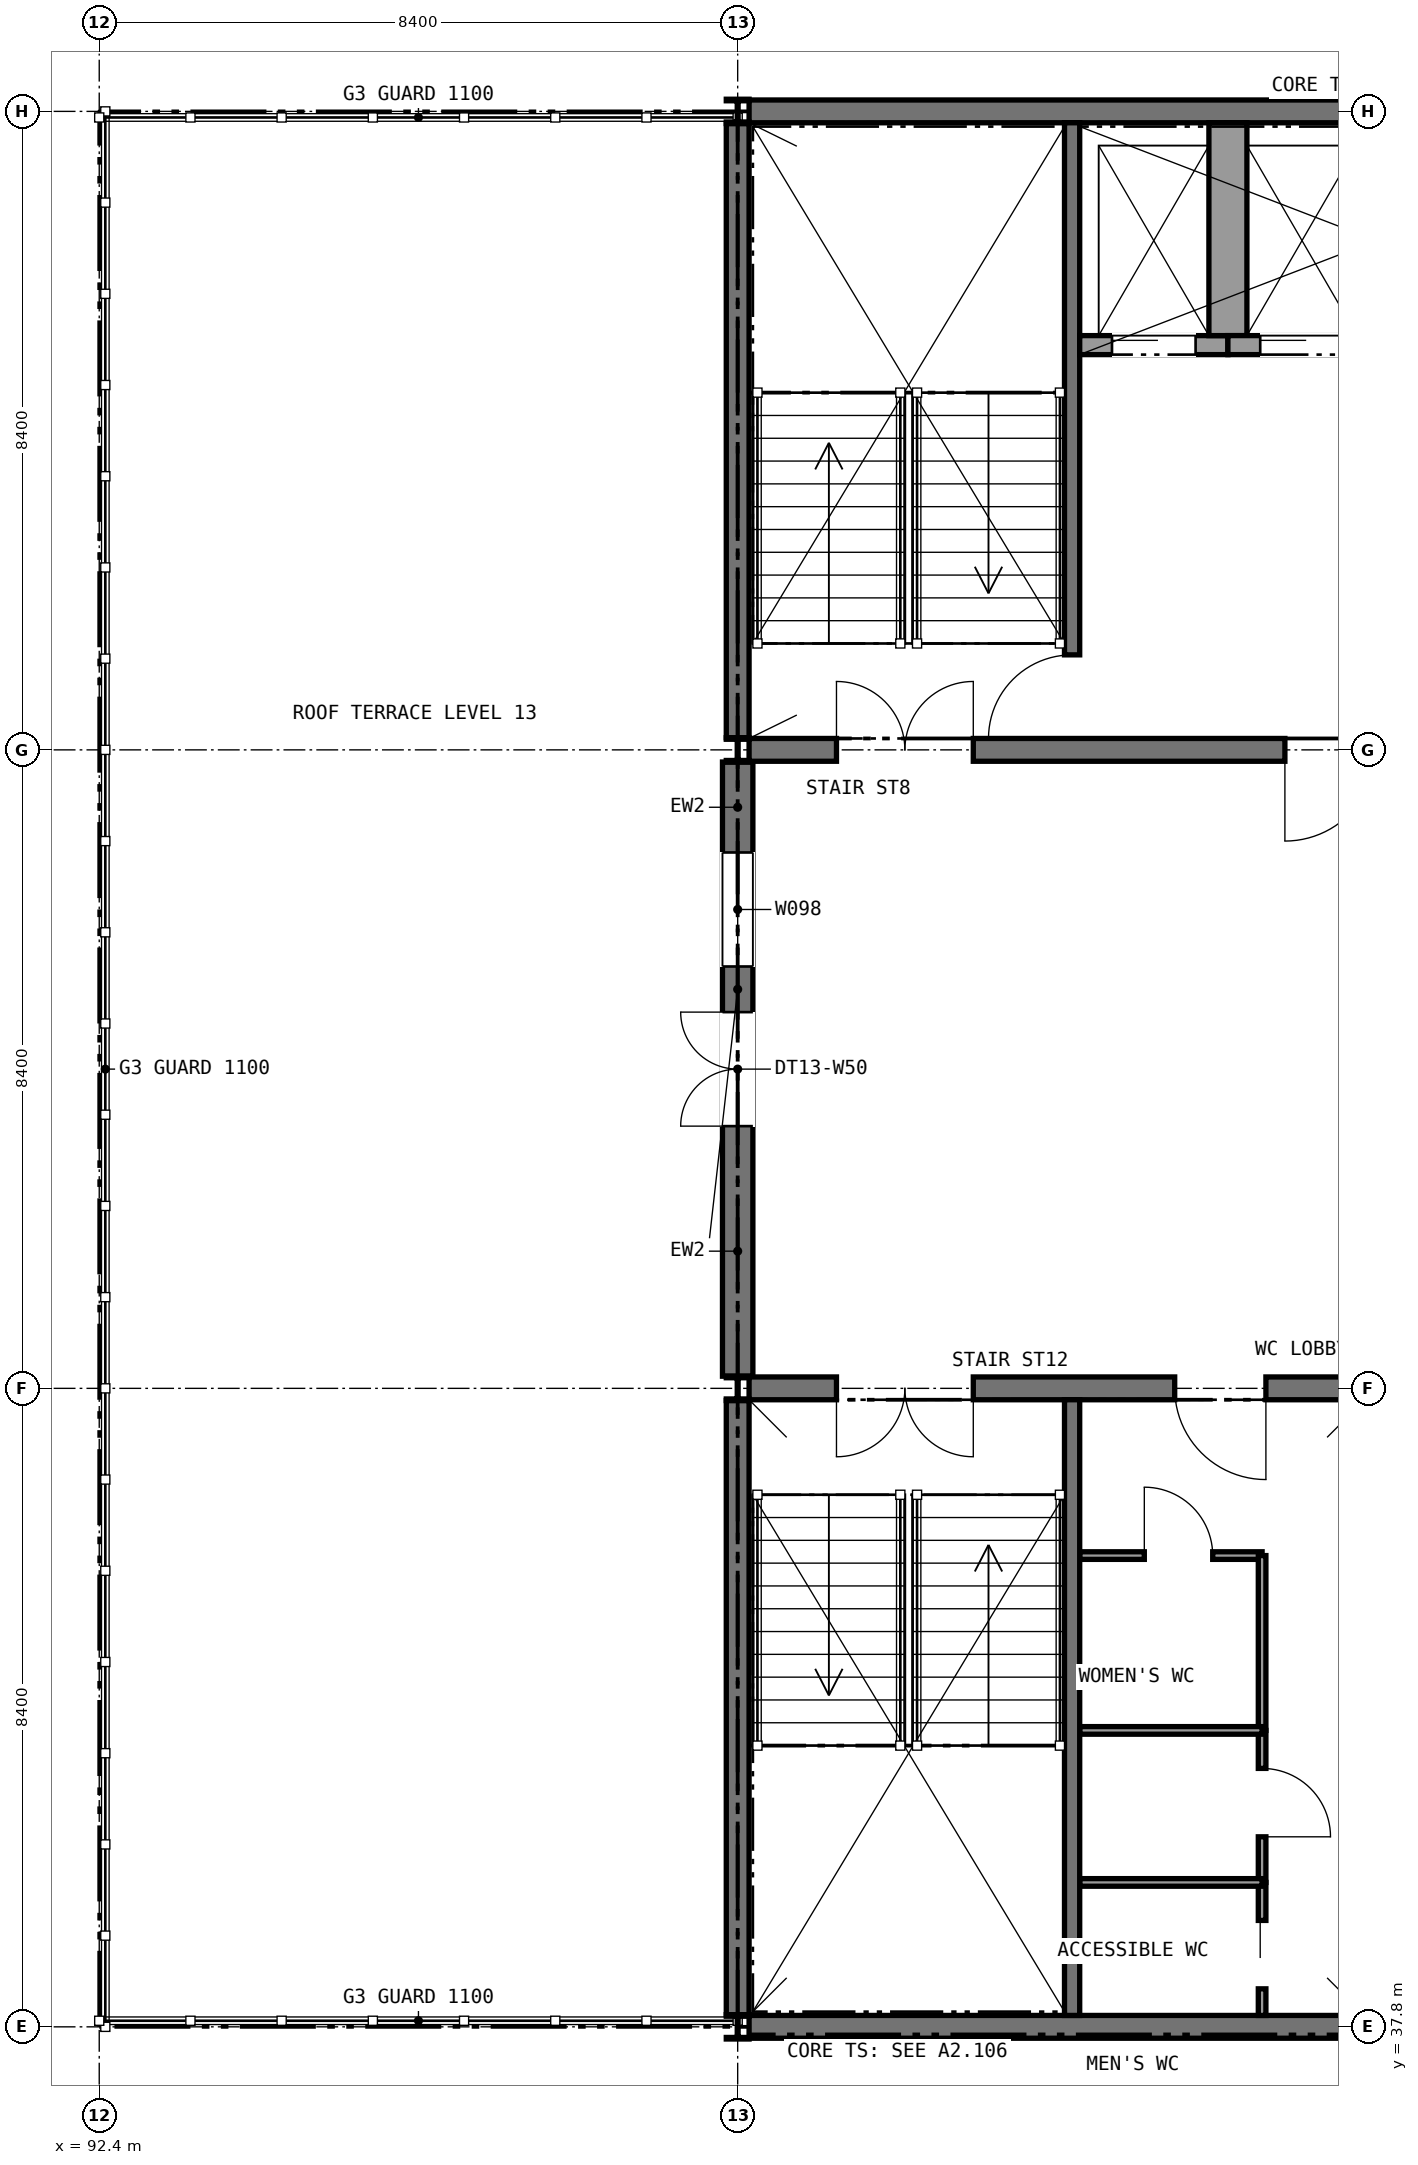
"""IFC4 building model, lengths in metres.
Left out: names, types, materials, properties, quantities, classifications, styles, units other than length and angle.
Written with IfcOpenShell. Run it as: python <this file> out.ifc"""

import sys

from ifc_helpers import new_model, si_unit, direction, frame, frame_2d, origin, origin_2d, place, context, subcontext, project, spatial, rectangle, i_section, extrude, element, fill, save


model = new_model("IFC4")
c1 = context("Model", 3, precision=1e-05, world=origin(), true_north=direction((0.0, 1.0)))
c2 = subcontext(c1, "Body", "Model", "MODEL_VIEW")
j1 = project(units=[si_unit("LENGTHUNIT", "METRE"), si_unit("PLANEANGLEUNIT", "RADIAN")], contexts=[c1])
p1 = place(None, origin())
s1 = spatial("IfcSite", under=j1, at=p1, CompositionType="ELEMENT")
p2 = place(p1, origin())
s2 = spatial("IfcBuilding", under=s1, at=p2, CompositionType="ELEMENT")
p3 = place(p2, frame((0.0, 0.0, 59.6)))
s3 = spatial("IfcBuildingStorey", under=s2, at=p3, CompositionType="ELEMENT", Elevation=59.6)
p4 = place(p3, frame((100.95, 63.0, 0.0), z_axis=(0.0, 0.0, 1.0), x_axis=(1.0, 0.0, 0.0)))
e1 = element("IfcWall", 1, at=p4, inside=s3, PredefinedType="SHEAR", context=c2, shape_type="SweptSolid", body=[
    extrude(rectangle(XDim=16.49, YDim=0.3, at=frame_2d((8.245, 0.0))), origin(), (0.0, 0.0, 1.0), 3.85),
])
p5 = place(p3, frame((100.95, 54.6, 0.0), z_axis=(0.0, 0.0, 1.0), x_axis=(1.0, 0.0, 0.0)))
e2 = element("IfcWall", 2, at=p5, inside=s3, PredefinedType="SHEAR", context=c2, shape_type="SweptSolid", body=[
    extrude(rectangle(XDim=16.49, YDim=0.3, at=frame_2d((8.245, 0.0))), origin(), (0.0, 0.0, 1.0), 3.85),
])
p6 = place(p5, frame((1.15, 0.0, 0.0)))
e3 = element("IfcOpeningElement", 3, at=p6, cuts=e2, PredefinedType="OPENING", context=c2, shape_type="SweptSolid", body=[
    extrude(rectangle(XDim=1.8, YDim=2.1, at=frame_2d((0.9, 1.05))), frame((0.0, 0.16, 0.0), z_axis=(0.0, -1.0, 0.0), x_axis=(1.0, 0.0, 0.0)), (0.0, 0.0, 1.0), 0.32),
])
p7 = place(p5, frame((13.55, 0.0, 0.0)))
e4 = element("IfcOpeningElement", 4, at=p7, cuts=e2, PredefinedType="OPENING", context=c2, shape_type="SweptSolid", body=[
    extrude(rectangle(XDim=1.8, YDim=2.1, at=frame_2d((0.9, 1.05))), frame((0.0, 0.16, 0.0), z_axis=(0.0, -1.0, 0.0), x_axis=(1.0, 0.0, 0.0)), (0.0, 0.0, 1.0), 0.32),
])
p8 = place(p5, frame((7.05, 0.0, 0.0)))
e5 = element("IfcOpeningElement", 5, at=p8, cuts=e2, PredefinedType="OPENING", context=c2, shape_type="SweptSolid", body=[
    extrude(rectangle(XDim=2.4, YDim=2.4, at=frame_2d((1.2, 1.2))), frame((0.0, 0.16, 0.0), z_axis=(0.0, -1.0, 0.0), x_axis=(1.0, 0.0, 0.0)), (0.0, 0.0, 1.0), 0.32),
])
p9 = place(p3, frame((100.8, 54.76, 0.0), z_axis=(0.0, 0.0, 1.0), x_axis=(0.0, 1.0, 0.0)))
e6 = element("IfcWall", 6, at=p9, inside=s3, PredefinedType="SHEAR", context=c2, shape_type="SweptSolid", body=[
    extrude(rectangle(XDim=8.08, YDim=0.3, at=frame_2d((4.04, 0.0))), origin(), (0.0, 0.0, 1.0), 3.85),
])
p10 = place(p3, frame((100.95, 37.8, 0.0), z_axis=(0.0, 0.0, 1.0), x_axis=(1.0, 0.0, 0.0)))
e7 = element("IfcWall", 7, at=p10, inside=s3, PredefinedType="SHEAR", context=c2, shape_type="SweptSolid", body=[
    extrude(rectangle(XDim=8.1, YDim=0.3, at=frame_2d((4.05, 0.0))), origin(), (0.0, 0.0, 1.0), 3.85),
])
p11 = place(p3, frame((100.95, 46.2, 0.0), z_axis=(0.0, 0.0, 1.0), x_axis=(1.0, 0.0, 0.0)))
e8 = element("IfcWall", 8, at=p11, inside=s3, PredefinedType="SHEAR", context=c2, shape_type="SweptSolid", body=[
    extrude(rectangle(XDim=8.1, YDim=0.3, at=frame_2d((4.05, 0.0))), origin(), (0.0, 0.0, 1.0), 3.85),
])
p12 = place(p11, frame((1.15, 0.0, 0.0)))
e9 = element("IfcOpeningElement", 9, at=p12, cuts=e8, PredefinedType="OPENING", context=c2, shape_type="SweptSolid", body=[
    extrude(rectangle(XDim=1.8, YDim=2.1, at=frame_2d((0.9, 1.05))), frame((0.0, 0.16, 0.0), z_axis=(0.0, -1.0, 0.0), x_axis=(1.0, 0.0, 0.0)), (0.0, 0.0, 1.0), 0.32),
])
p13 = place(p11, frame((5.6, 0.0, 0.0)))
e10 = element("IfcOpeningElement", 10, at=p13, cuts=e8, PredefinedType="OPENING", context=c2, shape_type="SweptSolid", body=[
    extrude(rectangle(XDim=1.2, YDim=2.1, at=frame_2d((0.6, 1.05))), frame((0.0, 0.16, 0.0), z_axis=(0.0, -1.0, 0.0), x_axis=(1.0, 0.0, 0.0)), (0.0, 0.0, 1.0), 0.32),
])
p14 = place(p3, frame((100.8, 37.96, 0.0), z_axis=(0.0, 0.0, 1.0), x_axis=(0.0, 1.0, 0.0)))
e11 = element("IfcWall", 11, at=p14, inside=s3, PredefinedType="SHEAR", context=c2, shape_type="SweptSolid", body=[
    extrude(rectangle(XDim=8.08, YDim=0.3, at=frame_2d((4.04, 0.0))), origin(), (0.0, 0.0, 1.0), 3.85),
])
for number, where, z_axis, x_axis in (
    (12, (100.8, 37.8, 0.0), (0.0, 0.0, 1.0), (1.0, 0.0, 0.0)),
    (13, (100.8, 46.2, 0.0), (0.0, 0.0, 1.0), (1.0, 0.0, 0.0)),
    (14, (100.8, 54.6, 0.0), (0.0, 0.0, 1.0), (1.0, 0.0, 0.0)),
    (15, (100.8, 63.0, 0.0), (0.0, 0.0, 1.0), (1.0, 0.0, 0.0)),
):
    element("IfcColumn", number, at=place(p3, frame(where, z_axis=z_axis, x_axis=x_axis)), inside=s3, PredefinedType="COLUMN", context=c2, shape_type="SweptSolid", body=[
        extrude(i_section(OverallWidth=0.3, OverallDepth=0.32, WebThickness=0.011, FlangeThickness=0.021, FilletRadius=0.027, at=origin_2d()), origin(), (0.0, 0.0, 1.0), 4.0),
    ])
p15 = place(p3, frame((105.3, 44.0, 0.0), z_axis=(0.0, 0.0, 1.0), x_axis=(1.0, 0.0, 0.0)))
e16 = element("IfcWall", 16, at=p15, inside=s3, PredefinedType="PARTITIONING", context=c2, shape_type="SweptSolid", body=[
    extrude(rectangle(XDim=2.4, YDim=0.1, at=frame_2d((1.2, 0.0))), origin(), (0.0, 0.0, 1.0), 3.78),
])
p16 = place(p15, frame((0.85, 0.0, 0.0)))
e17 = element("IfcOpeningElement", 17, at=p16, cuts=e16, PredefinedType="OPENING", context=c2, shape_type="SweptSolid", body=[
    extrude(rectangle(XDim=0.9, YDim=2.1, at=frame_2d((0.45, 1.05))), frame((0.0, 0.06, 0.0), z_axis=(0.0, -1.0, 0.0), x_axis=(1.0, 0.0, 0.0)), (0.0, 0.0, 1.0), 0.12),
])
p17 = place(p3, frame((107.7, 41.7, 0.0), z_axis=(0.0, 0.0, 1.0), x_axis=(0.0, 1.0, 0.0)))
e18 = element("IfcWall", 18, at=p17, inside=s3, PredefinedType="PARTITIONING", context=c2, shape_type="SweptSolid", body=[
    extrude(rectangle(XDim=2.3, YDim=0.1, at=frame_2d((1.15, 0.0))), origin(), (0.0, 0.0, 1.0), 3.78),
])
p18 = place(p3, frame((107.7, 39.7, 0.0), z_axis=(0.0, 0.0, 1.0), x_axis=(0.0, 1.0, 0.0)))
e19 = element("IfcWall", 19, at=p18, inside=s3, PredefinedType="PARTITIONING", context=c2, shape_type="SweptSolid", body=[
    extrude(rectangle(XDim=2.0, YDim=0.1, at=frame_2d((1.0, 0.0))), origin(), (0.0, 0.0, 1.0), 3.78),
])
p19 = place(p18, frame((0.6, 0.0, 0.0)))
e20 = element("IfcOpeningElement", 20, at=p19, cuts=e19, PredefinedType="OPENING", context=c2, shape_type="SweptSolid", body=[
    extrude(rectangle(XDim=0.9, YDim=2.1, at=frame_2d((0.45, 1.05))), frame((0.0, 0.06, 0.0), z_axis=(0.0, -1.0, 0.0), x_axis=(1.0, 0.0, 0.0)), (0.0, 0.0, 1.0), 0.12),
])
p20 = place(p3, frame((107.7, 37.95, 0.0), z_axis=(0.0, 0.0, 1.0), x_axis=(0.0, 1.0, 0.0)))
e21 = element("IfcWall", 21, at=p20, inside=s3, PredefinedType="PARTITIONING", context=c2, shape_type="SweptSolid", body=[
    extrude(rectangle(XDim=1.75, YDim=0.1, at=frame_2d((0.875, 0.0))), origin(), (0.0, 0.0, 1.0), 3.78),
])
p21 = place(p20, frame((0.35, 0.0, 0.0)))
e22 = element("IfcOpeningElement", 22, at=p21, cuts=e21, PredefinedType="OPENING", context=c2, shape_type="SweptSolid", body=[
    extrude(rectangle(XDim=0.9, YDim=2.1, at=frame_2d((0.45, 1.05))), frame((0.0, 0.06, 0.0), z_axis=(0.0, -1.0, 0.0), x_axis=(1.0, 0.0, 0.0)), (0.0, 0.0, 1.0), 0.12),
])
for number, where, z_axis, x_axis in (
    (23, (105.3, 41.7, 0.0), (0.0, 0.0, 1.0), (1.0, 0.0, 0.0)),
    (24, (105.3, 39.7, 0.0), (0.0, 0.0, 1.0), (1.0, 0.0, 0.0)),
):
    element("IfcWall", number, at=place(p3, frame(where, z_axis=z_axis, x_axis=x_axis)), inside=s3, PredefinedType="PARTITIONING", context=c2, shape_type="SweptSolid", body=[
        extrude(rectangle(XDim=2.4, YDim=0.1, at=frame_2d((1.2, 0.0))), origin(), (0.0, 0.0, 1.0), 3.78),
    ])
p22 = place(p3, frame((100.8, 46.36, 0.0), z_axis=(0.0, 0.0, 1.0), x_axis=(0.0, 1.0, 0.0)))
e25 = element("IfcWall", 25, at=p22, inside=s3, PredefinedType="STANDARD", context=c2, shape_type="SweptSolid", body=[
    extrude(rectangle(XDim=8.08, YDim=0.4, at=frame_2d((4.04, 0.0))), origin(), (0.0, 0.0, 1.0), 3.85),
])
p23 = place(p22, frame((5.39, 0.0, 0.9)))
e26 = element("IfcOpeningElement", 26, at=p23, cuts=e25, PredefinedType="OPENING", context=c2, shape_type="SweptSolid", body=[
    extrude(rectangle(XDim=1.5, YDim=2.1, at=frame_2d((0.75, 1.05))), frame((0.0, 0.21, 0.0), z_axis=(0.0, -1.0, 0.0), x_axis=(1.0, 0.0, 0.0)), (0.0, 0.0, 1.0), 0.42),
])
p24 = place(p22, frame((3.29, 0.0, 0.0)))
e27 = element("IfcOpeningElement", 27, at=p24, cuts=e25, PredefinedType="OPENING", context=c2, shape_type="SweptSolid", body=[
    extrude(rectangle(XDim=1.5, YDim=2.4, at=frame_2d((0.75, 1.2))), frame((0.0, 0.21, 0.0), z_axis=(0.0, -1.0, 0.0), x_axis=(1.0, 0.0, 0.0)), (0.0, 0.0, 1.0), 0.42),
])
p25 = place(p3, frame((105.2, 62.85, 0.0), z_axis=(0.0, 0.0, 1.0), x_axis=(0.0, -1.0, 0.0)))
e28 = element("IfcWall", 28, at=p25, inside=s3, PredefinedType="SHEAR", context=c2, shape_type="SweptSolid", body=[
    extrude(rectangle(XDim=8.1, YDim=0.2, at=frame_2d((4.05, 0.0))), origin(), (0.0, 0.0, 1.0), 3.85),
])
p26 = place(p25, frame((7.0, 0.0, 0.0)))
e29 = element("IfcOpeningElement", 29, at=p26, cuts=e28, PredefinedType="OPENING", context=c2, shape_type="SweptSolid", body=[
    extrude(rectangle(XDim=1.11, YDim=2.1, at=frame_2d((0.555, 1.05))), frame((0.0, 0.11, 0.0), z_axis=(0.0, -1.0, 0.0), x_axis=(1.0, 0.0, 0.0)), (0.0, 0.0, 1.0), 0.22),
])
p27 = place(p3, frame((105.3, 59.925, 0.0), z_axis=(0.0, 0.0, 1.0), x_axis=(1.0, 0.0, 0.0)))
e30 = element("IfcWall", 30, at=p27, inside=s3, PredefinedType="SOLIDWALL", context=c2, shape_type="SweptSolid", body=[
    extrude(rectangle(XDim=1.95, YDim=0.25, at=frame_2d((0.975, 0.0))), origin(), (0.0, 0.0, 1.0), 4.0),
])
p28 = place(p27, frame((0.425, 0.0, 0.0)))
e31 = element("IfcOpeningElement", 31, at=p28, cuts=e30, PredefinedType="OPENING", context=c2, shape_type="SweptSolid", body=[
    extrude(rectangle(XDim=1.1, YDim=2.1, at=frame_2d((0.55, 1.05))), frame((0.0, 0.135, 0.0), z_axis=(0.0, -1.0, 0.0), x_axis=(1.0, 0.0, 0.0)), (0.0, 0.0, 1.0), 0.27),
])
p29 = place(p3, frame((107.25, 62.85, 0.0), z_axis=(0.0, 0.0, 1.0), x_axis=(0.0, -1.0, 0.0)))
e32 = element("IfcWall", 32, at=p29, inside=s3, PredefinedType="SOLIDWALL", context=c2, shape_type="SweptSolid", body=[
    extrude(rectangle(XDim=2.8, YDim=0.5, at=frame_2d((1.4, 0.0))), origin(), (0.0, 0.0, 1.0), 4.0),
])
p30 = place(p3, frame((107.25, 59.925, 0.0), z_axis=(0.0, 0.0, 1.0), x_axis=(1.0, 0.0, 0.0)))
e33 = element("IfcWall", 33, at=p30, inside=s3, PredefinedType="SOLIDWALL", context=c2, shape_type="SweptSolid", body=[
    extrude(rectangle(XDim=1.95, YDim=0.25, at=frame_2d((0.975, 0.0))), origin(), (0.0, 0.0, 1.0), 4.0),
])
p31 = place(p30, frame((0.425, 0.0, 0.0)))
e34 = element("IfcOpeningElement", 34, at=p31, cuts=e33, PredefinedType="OPENING", context=c2, shape_type="SweptSolid", body=[
    extrude(rectangle(XDim=1.1, YDim=2.1, at=frame_2d((0.55, 1.05))), frame((0.0, 0.135, 0.0), z_axis=(0.0, -1.0, 0.0), x_axis=(1.0, 0.0, 0.0)), (0.0, 0.0, 1.0), 0.27),
])
p32 = place(p3, frame((105.2, 37.95, 0.0), z_axis=(0.0, 0.0, 1.0), x_axis=(0.0, 1.0, 0.0)))
e35 = element("IfcWall", 35, at=p32, inside=s3, PredefinedType="SHEAR", context=c2, shape_type="SweptSolid", body=[
    extrude(rectangle(XDim=8.1, YDim=0.2, at=frame_2d((4.05, 0.0))), origin(), (0.0, 0.0, 1.0), 3.85),
])
p33 = place(p16, origin())
e36 = element("IfcDoor", 36, at=p33, inside=s3, OperationType="SINGLE_SWING_LEFT", PredefinedType="DOOR", context=c2, shape_type="SweptSolid", body=[
    extrude(rectangle(XDim=0.9, YDim=2.1, at=frame_2d((0.45, 1.05))), frame((0.0, 0.025, 0.0), z_axis=(0.0, -1.0, 0.0), x_axis=(1.0, 0.0, 0.0)), (0.0, 0.0, 1.0), 0.05),
])
fill(e17, e36)
p34 = place(p19, frame((0.9, 0.0, 0.0), z_axis=(0.0, 0.0, 1.0), x_axis=(-1.0, 0.0, 0.0)))
e37 = element("IfcDoor", 37, at=p34, inside=s3, OperationType="SINGLE_SWING_RIGHT", PredefinedType="DOOR", context=c2, shape_type="SweptSolid", body=[
    extrude(rectangle(XDim=0.9, YDim=2.1, at=frame_2d((0.45, 1.05))), frame((0.0, 0.025, 0.0), z_axis=(0.0, -1.0, 0.0), x_axis=(1.0, 0.0, 0.0)), (0.0, 0.0, 1.0), 0.05),
])
fill(e20, e37)
p35 = place(p21, origin())
e38 = element("IfcDoor", 38, at=p35, inside=s3, OperationType="SLIDING_TO_RIGHT", PredefinedType="DOOR", context=c2, shape_type="SweptSolid", body=[
    extrude(rectangle(XDim=0.9, YDim=2.1, at=frame_2d((0.45, 1.05))), frame((0.0, 0.025, 0.0), z_axis=(0.0, -1.0, 0.0), x_axis=(1.0, 0.0, 0.0)), (0.0, 0.0, 1.0), 0.05),
])
fill(e22, e38)
p36 = place(p23, origin())
e39 = element("IfcWindow", 39, at=p36, inside=s3, PartitioningType="SINGLE_PANEL", PredefinedType="WINDOW", context=c2, shape_type="SweptSolid", body=[
    extrude(rectangle(XDim=1.5, YDim=2.1, at=frame_2d((0.75, 1.05))), frame((0.0, 0.03, 0.0), z_axis=(0.0, -1.0, 0.0), x_axis=(1.0, 0.0, 0.0)), (0.0, 0.0, 1.0), 0.06),
])
fill(e26, e39)
p37 = place(p24, origin())
e40 = element("IfcDoor", 40, at=p37, inside=s3, OperationType="DOUBLE_DOOR_SINGLE_SWING", PredefinedType="DOOR", context=c2, shape_type="SweptSolid", body=[
    extrude(rectangle(XDim=1.5, YDim=2.4, at=frame_2d((0.75, 1.2))), frame((0.0, 0.025, 0.0), z_axis=(0.0, -1.0, 0.0), x_axis=(1.0, 0.0, 0.0)), (0.0, 0.0, 1.0), 0.05),
])
fill(e27, e40)
p38 = place(p26, frame((1.1, 0.0, 0.0), z_axis=(0.0, 0.0, 1.0), x_axis=(-1.0, 0.0, 0.0)))
e41 = element("IfcDoor", 41, at=p38, inside=s3, OperationType="SINGLE_SWING_LEFT", PredefinedType="DOOR", context=c2, shape_type="SweptSolid", body=[
    extrude(rectangle(XDim=1.1, YDim=2.1, at=frame_2d((0.55, 1.05))), frame((0.0, 0.025, 0.0), z_axis=(0.0, -1.0, 0.0), x_axis=(1.0, 0.0, 0.0)), (0.0, 0.0, 1.0), 0.05),
])
fill(e29, e41)
p39 = place(p28, frame((1.1, 0.0, 0.0), z_axis=(0.0, 0.0, 1.0), x_axis=(-1.0, 0.0, 0.0)))
e42 = element("IfcDoor", 42, at=p39, inside=s3, OperationType="SLIDING_TO_RIGHT", PredefinedType="DOOR", context=c2, shape_type="SweptSolid", body=[
    extrude(rectangle(XDim=1.1, YDim=2.1, at=frame_2d((0.55, 1.05))), frame((0.0, 0.025, 0.0), z_axis=(0.0, -1.0, 0.0), x_axis=(1.0, 0.0, 0.0)), (0.0, 0.0, 1.0), 0.05),
])
fill(e31, e42)
p40 = place(p31, frame((1.1, 0.0, 0.0), z_axis=(0.0, 0.0, 1.0), x_axis=(-1.0, 0.0, 0.0)))
e43 = element("IfcDoor", 43, at=p40, inside=s3, OperationType="SLIDING_TO_RIGHT", PredefinedType="DOOR", context=c2, shape_type="SweptSolid", body=[
    extrude(rectangle(XDim=1.1, YDim=2.1, at=frame_2d((0.55, 1.05))), frame((0.0, 0.025, 0.0), z_axis=(0.0, -1.0, 0.0), x_axis=(1.0, 0.0, 0.0)), (0.0, 0.0, 1.0), 0.05),
])
fill(e34, e43)
p41 = place(p6, origin())
e44 = element("IfcDoor", 44, at=p41, inside=s3, OperationType="DOUBLE_DOOR_SINGLE_SWING", PredefinedType="DOOR", context=c2, shape_type="SweptSolid", body=[
    extrude(rectangle(XDim=1.8, YDim=2.1, at=frame_2d((0.9, 1.05))), frame((0.0, 0.025, 0.0), z_axis=(0.0, -1.0, 0.0), x_axis=(1.0, 0.0, 0.0)), (0.0, 0.0, 1.0), 0.05),
])
fill(e3, e44)
p42 = place(p8, frame((2.4, 0.0, 0.0), z_axis=(0.0, 0.0, 1.0), x_axis=(-1.0, 0.0, 0.0)))
e45 = element("IfcDoor", 45, at=p42, inside=s3, OperationType="DOUBLE_DOOR_SINGLE_SWING", PredefinedType="DOOR", context=c2, shape_type="SweptSolid", body=[
    extrude(rectangle(XDim=2.4, YDim=2.4, at=frame_2d((1.2, 1.2))), frame((0.0, 0.025, 0.0), z_axis=(0.0, -1.0, 0.0), x_axis=(1.0, 0.0, 0.0)), (0.0, 0.0, 1.0), 0.05),
])
fill(e5, e45)
p43 = place(p12, frame((1.8, 0.0, 0.0), z_axis=(0.0, 0.0, 1.0), x_axis=(-1.0, 0.0, 0.0)))
e46 = element("IfcDoor", 46, at=p43, inside=s3, OperationType="DOUBLE_DOOR_SINGLE_SWING", PredefinedType="DOOR", context=c2, shape_type="SweptSolid", body=[
    extrude(rectangle(XDim=1.8, YDim=2.1, at=frame_2d((0.9, 1.05))), frame((0.0, 0.025, 0.0), z_axis=(0.0, -1.0, 0.0), x_axis=(1.0, 0.0, 0.0)), (0.0, 0.0, 1.0), 0.05),
])
fill(e9, e46)
p44 = place(p13, frame((1.2, 0.0, 0.0), z_axis=(0.0, 0.0, 1.0), x_axis=(-1.0, 0.0, 0.0)))
e47 = element("IfcDoor", 47, at=p44, inside=s3, OperationType="SINGLE_SWING_LEFT", PredefinedType="DOOR", context=c2, shape_type="SweptSolid", body=[
    extrude(rectangle(XDim=1.2, YDim=2.1, at=frame_2d((0.6, 1.05))), frame((0.0, 0.025, 0.0), z_axis=(0.0, -1.0, 0.0), x_axis=(1.0, 0.0, 0.0)), (0.0, 0.0, 1.0), 0.05),
])
fill(e10, e47)
save(model, sys.argv[1])
